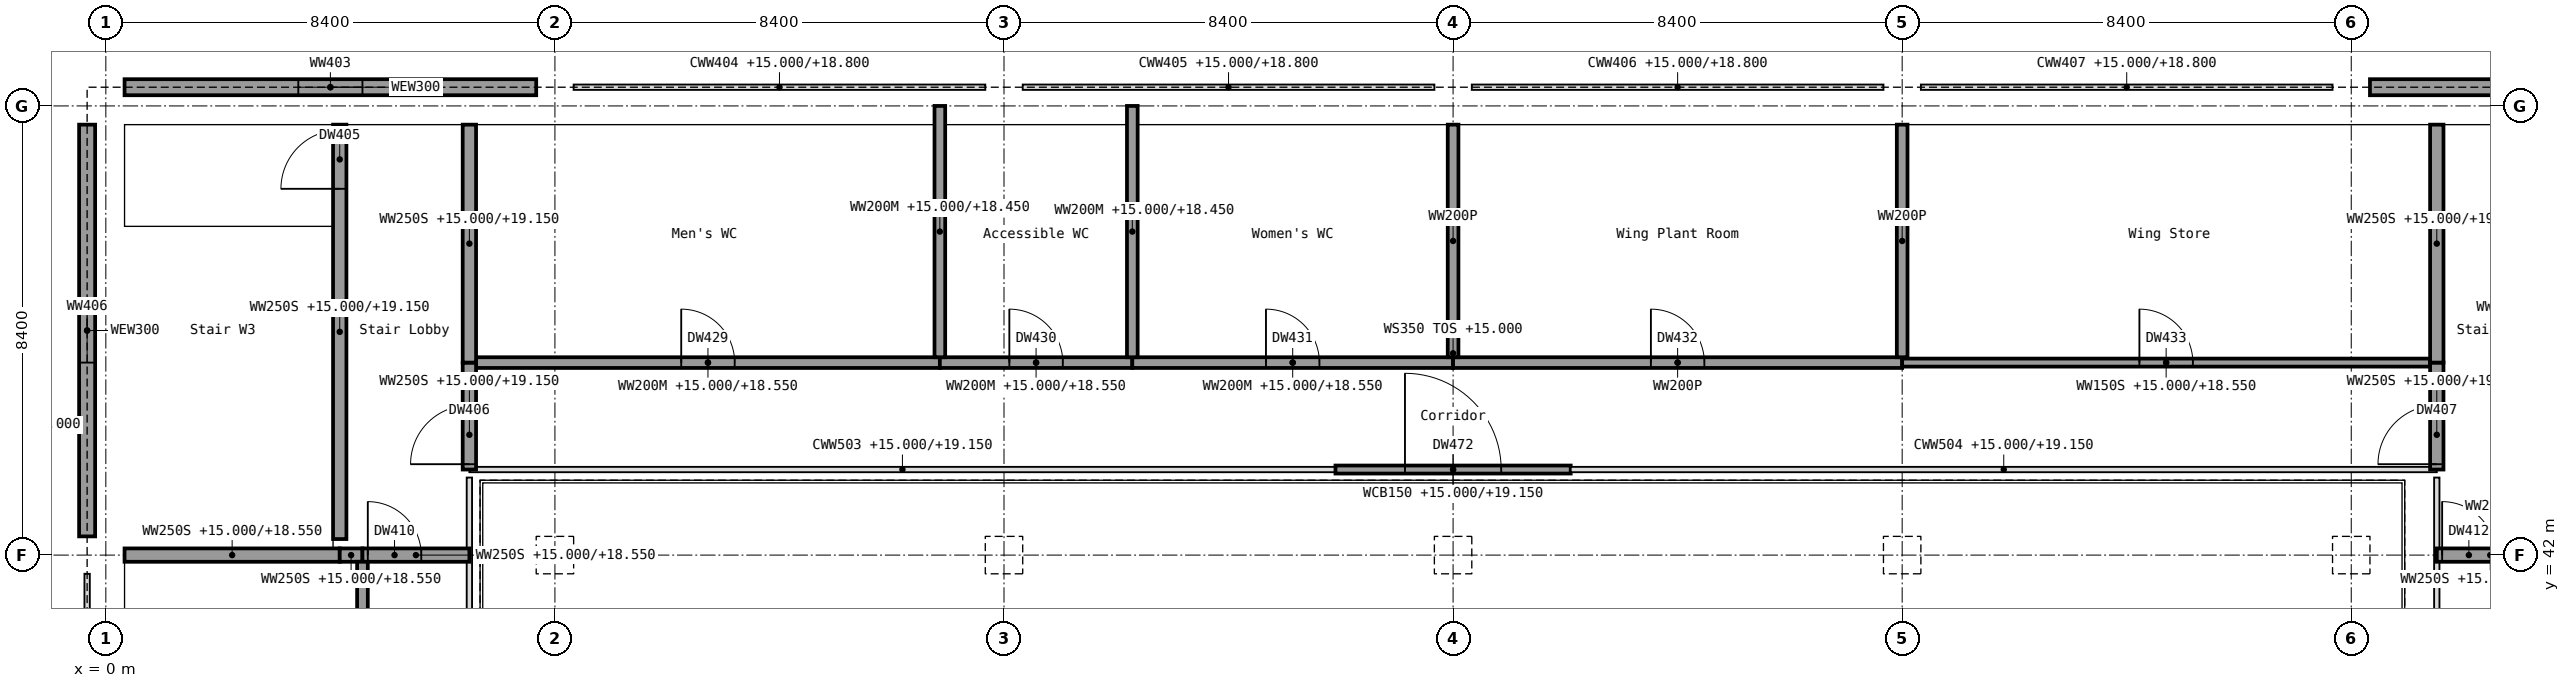
"""IFC4 building model, lengths in metres.
Left out: names, types, materials, properties, quantities, classifications, styles, units other than length and angle.
Written with IfcOpenShell. Run it as: python <this file> out.ifc"""

import sys

from ifc_helpers import new_model, si_unit, direction, frame, frame_2d, origin, origin_2d, place, context, subcontext, project, spatial, rectangle, extrude, element, fill, save


model = new_model("IFC4")
c1 = context("Model", 3, precision=1e-05, world=origin(), true_north=direction((0.0, 1.0)))
c2 = subcontext(c1, "Body", "Model", "MODEL_VIEW")
j1 = project(units=[si_unit("LENGTHUNIT", "METRE"), si_unit("PLANEANGLEUNIT", "RADIAN")], contexts=[c1])
p1 = place(None, origin())
s1 = spatial("IfcSite", under=j1, at=p1, CompositionType="ELEMENT")
p2 = place(p1, origin())
s2 = spatial("IfcBuilding", under=s1, at=p2, CompositionType="ELEMENT")
p3 = place(p2, frame((0.0, 0.0, 15.0)))
s3 = spatial("IfcBuildingStorey", under=s2, at=p3, CompositionType="ELEMENT", Elevation=15.0)
for number, where, z_axis, x_axis in (
    (1, (0.0, 42.0, 0.0), (0.0, 0.0, 1.0), (1.0, 0.0, 0.0)),
    (2, (0.0, 50.4, 0.0), (0.0, 0.0, 1.0), (1.0, 0.0, 0.0)),
    (3, (8.4, 42.0, 0.0), (0.0, 0.0, 1.0), (1.0, 0.0, 0.0)),
    (4, (8.4, 50.4, 0.0), (0.0, 0.0, 1.0), (1.0, 0.0, 0.0)),
    (5, (16.8, 42.0, 0.0), (0.0, 0.0, 1.0), (1.0, 0.0, 0.0)),
    (6, (16.8, 50.4, 0.0), (0.0, 0.0, 1.0), (1.0, 0.0, 0.0)),
    (7, (25.2, 42.0, 0.0), (0.0, 0.0, 1.0), (1.0, 0.0, 0.0)),
    (8, (25.2, 50.4, 0.0), (0.0, 0.0, 1.0), (1.0, 0.0, 0.0)),
    (9, (33.6, 42.0, 0.0), (0.0, 0.0, 1.0), (1.0, 0.0, 0.0)),
    (10, (33.6, 50.4, 0.0), (0.0, 0.0, 1.0), (1.0, 0.0, 0.0)),
    (11, (42.0, 42.0, 0.0), (0.0, 0.0, 1.0), (1.0, 0.0, 0.0)),
    (12, (42.0, 50.4, 0.0), (0.0, 0.0, 1.0), (1.0, 0.0, 0.0)),
):
    element("IfcColumn", number, at=place(p3, frame(where, z_axis=z_axis, x_axis=x_axis)), inside=s3, PredefinedType="COLUMN", context=c2, shape_type="SweptSolid", body=[
        extrude(rectangle(XDim=0.7, YDim=0.7, at=origin_2d()), origin(), (0.0, 0.0, 1.0), 4.5),
    ])
p4 = place(p3, frame((0.35, 50.75, 0.0), z_axis=(0.0, 0.0, 1.0), x_axis=(1.0, 0.0, 0.0)))
e13 = element("IfcWall", 13, at=p4, inside=s3, PredefinedType="SOLIDWALL", context=c2, shape_type="SweptSolid", body=[
    extrude(rectangle(XDim=7.7, YDim=0.3, at=frame_2d((3.85, 0.0))), origin(), (0.0, 0.0, 1.0), 3.8),
])
p5 = place(p4, frame((3.25, 0.0, 1.0)))
e14 = element("IfcOpeningElement", 14, at=p5, cuts=e13, PredefinedType="OPENING", context=c2, shape_type="SweptSolid", body=[
    extrude(rectangle(XDim=1.2, YDim=1.5, at=frame_2d((0.6, 0.75))), frame((0.0, 0.15, 0.0), z_axis=(0.0, -1.0, 0.0), x_axis=(1.0, 0.0, 0.0)), (0.0, 0.0, 1.0), 0.3),
])
p6 = place(p3, frame((42.35, 50.75, 0.0), z_axis=(0.0, 0.0, 1.0), x_axis=(1.0, 0.0, 0.0)))
e15 = element("IfcWall", 15, at=p6, inside=s3, PredefinedType="SOLIDWALL", context=c2, shape_type="SweptSolid", body=[
    extrude(rectangle(XDim=7.7, YDim=0.3, at=frame_2d((3.85, 0.0))), origin(), (0.0, 0.0, 1.0), 3.8),
])
p7 = place(p6, frame((3.25, 0.0, 1.0)))
e16 = element("IfcOpeningElement", 16, at=p7, cuts=e15, PredefinedType="OPENING", context=c2, shape_type="SweptSolid", body=[
    extrude(rectangle(XDim=1.2, YDim=1.5, at=frame_2d((0.6, 0.75))), frame((0.0, 0.15, 0.0), z_axis=(0.0, -1.0, 0.0), x_axis=(1.0, 0.0, 0.0)), (0.0, 0.0, 1.0), 0.3),
])
p8 = place(p3, frame((-0.35, 42.35, 0.0), z_axis=(0.0, 0.0, 1.0), x_axis=(0.0, 1.0, 0.0)))
e17 = element("IfcWall", 17, at=p8, inside=s3, PredefinedType="SOLIDWALL", context=c2, shape_type="SweptSolid", body=[
    extrude(rectangle(XDim=7.7, YDim=0.3, at=frame_2d((3.85, 0.0))), origin(), (0.0, 0.0, 1.0), 3.8),
])
p9 = place(p8, frame((3.25, 0.0, 1.0)))
e18 = element("IfcOpeningElement", 18, at=p9, cuts=e17, PredefinedType="OPENING", context=c2, shape_type="SweptSolid", body=[
    extrude(rectangle(XDim=1.2, YDim=1.5, at=frame_2d((0.6, 0.75))), frame((0.0, 0.15, 0.0), z_axis=(0.0, -1.0, 0.0), x_axis=(1.0, 0.0, 0.0)), (0.0, 0.0, 1.0), 0.3),
])
p10 = place(p3, frame((23.0, 43.6, 0.0), z_axis=(0.0, 0.0, 1.0), x_axis=(1.0, 0.0, 0.0)))
e19 = element("IfcWall", 19, at=p10, inside=s3, PredefinedType="SOLIDWALL", context=c2, shape_type="SweptSolid", body=[
    extrude(rectangle(XDim=4.4, YDim=0.15, at=frame_2d((2.2, 0.0))), origin(), (0.0, 0.0, 1.0), 4.15),
])
p11 = place(p10, frame((1.3, 0.0, 0.0)))
e20 = element("IfcOpeningElement", 20, at=p11, cuts=e19, PredefinedType="OPENING", context=c2, shape_type="SweptSolid", body=[
    extrude(rectangle(XDim=1.8, YDim=2.4, at=frame_2d((0.9, 1.2))), frame((0.0, 0.075, 0.0), z_axis=(0.0, -1.0, 0.0), x_axis=(1.0, 0.0, 0.0)), (0.0, 0.0, 1.0), 0.15),
])
p12 = place(p3, frame((0.35, 42.0, 0.0), z_axis=(0.0, 0.0, 1.0), x_axis=(1.0, 0.0, 0.0)))
e21 = element("IfcWall", 21, at=p12, inside=s3, PredefinedType="SHEAR", context=c2, shape_type="SweptSolid", body=[
    extrude(rectangle(XDim=4.025, YDim=0.25, at=frame_2d((2.012, 0.0))), origin(), (0.0, 0.0, 1.0), 3.55),
])
p13 = place(p3, frame((4.375, 42.0, 0.0), z_axis=(0.0, 0.0, 1.0), x_axis=(1.0, 0.0, 0.0)))
e22 = element("IfcWall", 22, at=p13, inside=s3, PredefinedType="SHEAR", context=c2, shape_type="SweptSolid", body=[
    extrude(rectangle(XDim=0.425, YDim=0.25, at=frame_2d((0.212, 0.0))), origin(), (0.0, 0.0, 1.0), 3.55),
])
p14 = place(p3, frame((4.8, 42.0, 0.0), z_axis=(0.0, 0.0, 1.0), x_axis=(1.0, 0.0, 0.0)))
e23 = element("IfcWall", 23, at=p14, inside=s3, PredefinedType="SHEAR", context=c2, shape_type="SweptSolid", body=[
    extrude(rectangle(XDim=2.0, YDim=0.25, at=frame_2d((1.0, 0.0))), origin(), (0.0, 0.0, 1.0), 3.55),
])
p15 = place(p14, frame((0.1, 0.0, 0.0)))
e24 = element("IfcOpeningElement", 24, at=p15, cuts=e23, PredefinedType="OPENING", context=c2, shape_type="SweptSolid", body=[
    extrude(rectangle(XDim=1.0, YDim=2.1, at=frame_2d((0.5, 1.05))), frame((0.0, 0.125, 0.0), z_axis=(0.0, -1.0, 0.0), x_axis=(1.0, 0.0, 0.0)), (0.0, 0.0, 1.0), 0.25),
])
p16 = place(p3, frame((43.6, 42.0, 0.0), z_axis=(0.0, 0.0, 1.0), x_axis=(1.0, 0.0, 0.0)))
e25 = element("IfcWall", 25, at=p16, inside=s3, PredefinedType="SHEAR", context=c2, shape_type="SweptSolid", body=[
    extrude(rectangle(XDim=2.0, YDim=0.25, at=frame_2d((1.0, 0.0))), origin(), (0.0, 0.0, 1.0), 3.55),
])
p17 = place(p16, frame((0.1, 0.0, 0.0)))
e26 = element("IfcOpeningElement", 26, at=p17, cuts=e25, PredefinedType="OPENING", context=c2, shape_type="SweptSolid", body=[
    extrude(rectangle(XDim=1.0, YDim=2.1, at=frame_2d((0.5, 1.05))), frame((0.0, 0.125, 0.0), z_axis=(0.0, -1.0, 0.0), x_axis=(1.0, 0.0, 0.0)), (0.0, 0.0, 1.0), 0.25),
])
p18 = place(p3, frame((6.925, 45.6, 0.0), z_axis=(0.0, 0.0, 1.0), x_axis=(1.0, 0.0, 0.0)))
e27 = element("IfcWall", 27, at=p18, inside=s3, PredefinedType="PARTITIONING", context=c2, shape_type="SweptSolid", body=[
    extrude(rectangle(XDim=8.675, YDim=0.2, at=frame_2d((4.337, 0.0))), origin(), (0.0, 0.0, 1.0), 3.55),
])
p19 = place(p18, frame((3.837, 0.0, 0.0)))
e28 = element("IfcOpeningElement", 28, at=p19, cuts=e27, PredefinedType="OPENING", context=c2, shape_type="SweptSolid", body=[
    extrude(rectangle(XDim=1.0, YDim=2.1, at=frame_2d((0.5, 1.05))), frame((0.0, 0.1, 0.0), z_axis=(0.0, -1.0, 0.0), x_axis=(1.0, 0.0, 0.0)), (0.0, 0.0, 1.0), 0.2),
])
p20 = place(p3, frame((15.6, 45.6, 0.0), z_axis=(0.0, 0.0, 1.0), x_axis=(1.0, 0.0, 0.0)))
e29 = element("IfcWall", 29, at=p20, inside=s3, PredefinedType="PARTITIONING", context=c2, shape_type="SweptSolid", body=[
    extrude(rectangle(XDim=3.6, YDim=0.2, at=frame_2d((1.8, 0.0))), origin(), (0.0, 0.0, 1.0), 3.55),
])
p21 = place(p20, frame((1.3, 0.0, 0.0)))
e30 = element("IfcOpeningElement", 30, at=p21, cuts=e29, PredefinedType="OPENING", context=c2, shape_type="SweptSolid", body=[
    extrude(rectangle(XDim=1.0, YDim=2.1, at=frame_2d((0.5, 1.05))), frame((0.0, 0.1, 0.0), z_axis=(0.0, -1.0, 0.0), x_axis=(1.0, 0.0, 0.0)), (0.0, 0.0, 1.0), 0.2),
])
p22 = place(p3, frame((19.2, 45.6, 0.0), z_axis=(0.0, 0.0, 1.0), x_axis=(1.0, 0.0, 0.0)))
e31 = element("IfcWall", 31, at=p22, inside=s3, PredefinedType="PARTITIONING", context=c2, shape_type="SweptSolid", body=[
    extrude(rectangle(XDim=6.0, YDim=0.2, at=frame_2d((3.0, 0.0))), origin(), (0.0, 0.0, 1.0), 3.55),
])
p23 = place(p22, frame((2.5, 0.0, 0.0)))
e32 = element("IfcOpeningElement", 32, at=p23, cuts=e31, PredefinedType="OPENING", context=c2, shape_type="SweptSolid", body=[
    extrude(rectangle(XDim=1.0, YDim=2.1, at=frame_2d((0.5, 1.05))), frame((0.0, 0.1, 0.0), z_axis=(0.0, -1.0, 0.0), x_axis=(1.0, 0.0, 0.0)), (0.0, 0.0, 1.0), 0.2),
])
p24 = place(p3, frame((25.2, 45.6, 0.0), z_axis=(0.0, 0.0, 1.0), x_axis=(1.0, 0.0, 0.0)))
e33 = element("IfcWall", 33, at=p24, inside=s3, PredefinedType="SOLIDWALL", context=c2, shape_type="SweptSolid", body=[
    extrude(rectangle(XDim=8.4, YDim=0.2, at=frame_2d((4.2, 0.0))), origin(), (0.0, 0.0, 1.0), 3.55),
])
p25 = place(p24, frame((3.7, 0.0, 0.0)))
e34 = element("IfcOpeningElement", 34, at=p25, cuts=e33, PredefinedType="OPENING", context=c2, shape_type="SweptSolid", body=[
    extrude(rectangle(XDim=1.0, YDim=2.1, at=frame_2d((0.5, 1.05))), frame((0.0, 0.1, 0.0), z_axis=(0.0, -1.0, 0.0), x_axis=(1.0, 0.0, 0.0)), (0.0, 0.0, 1.0), 0.2),
])
p26 = place(p3, frame((33.6, 45.6, 0.0), z_axis=(0.0, 0.0, 1.0), x_axis=(1.0, 0.0, 0.0)))
e35 = element("IfcWall", 35, at=p26, inside=s3, PredefinedType="PARTITIONING", context=c2, shape_type="SweptSolid", body=[
    extrude(rectangle(XDim=9.875, YDim=0.15, at=frame_2d((4.938, 0.0))), origin(), (0.0, 0.0, 1.0), 3.55),
])
p27 = place(p26, frame((4.438, 0.0, 0.0)))
e36 = element("IfcOpeningElement", 36, at=p27, cuts=e35, PredefinedType="OPENING", context=c2, shape_type="SweptSolid", body=[
    extrude(rectangle(XDim=1.0, YDim=2.1, at=frame_2d((0.5, 1.05))), frame((0.0, 0.075, 0.0), z_axis=(0.0, -1.0, 0.0), x_axis=(1.0, 0.0, 0.0)), (0.0, 0.0, 1.0), 0.15),
])
p28 = place(p3, frame((4.375, 42.3, 0.0), z_axis=(0.0, 0.0, 1.0), x_axis=(0.0, 1.0, 0.0)))
e37 = element("IfcWall", 37, at=p28, inside=s3, PredefinedType="SHEAR", context=c2, shape_type="SweptSolid", body=[
    extrude(rectangle(XDim=7.75, YDim=0.25, at=frame_2d((3.875, 0.0))), origin(), (0.0, 0.0, 1.0), 4.15),
])
p29 = place(p28, frame((6.55, 0.0, 0.0)))
e38 = element("IfcOpeningElement", 38, at=p29, cuts=e37, PredefinedType="OPENING", context=c2, shape_type="SweptSolid", body=[
    extrude(rectangle(XDim=1.1, YDim=2.1, at=frame_2d((0.55, 1.05))), frame((0.0, 0.125, 0.0), z_axis=(0.0, -1.0, 0.0), x_axis=(1.0, 0.0, 0.0)), (0.0, 0.0, 1.0), 0.25),
])
p30 = place(p3, frame((4.8, 33.6, 0.0), z_axis=(0.0, 0.0, 1.0), x_axis=(0.0, 1.0, 0.0)))
e39 = element("IfcWall", 39, at=p30, inside=s3, PredefinedType="PARTITIONING", context=c2, shape_type="SweptSolid", body=[
    extrude(rectangle(XDim=8.275, YDim=0.2, at=frame_2d((4.137, 0.0))), origin(), (0.0, 0.0, 1.0), 3.55),
])
p31 = place(p30, frame((3.637, 0.0, 0.0)))
e40 = element("IfcOpeningElement", 40, at=p31, cuts=e39, PredefinedType="OPENING", context=c2, shape_type="SweptSolid", body=[
    extrude(rectangle(XDim=1.0, YDim=2.1, at=frame_2d((0.5, 1.05))), frame((0.0, 0.1, 0.0), z_axis=(0.0, -1.0, 0.0), x_axis=(1.0, 0.0, 0.0)), (0.0, 0.0, 1.0), 0.2),
])
p32 = place(p3, frame((6.8, 43.6, 0.0), z_axis=(0.0, 0.0, 1.0), x_axis=(0.0, 1.0, 0.0)))
e41 = element("IfcWall", 41, at=p32, inside=s3, PredefinedType="SHEAR", context=c2, shape_type="SweptSolid", body=[
    extrude(rectangle(XDim=2.0, YDim=0.25, at=frame_2d((1.0, 0.0))), origin(), (0.0, 0.0, 1.0), 4.15),
])
p33 = place(p32, frame((0.1, 0.0, 0.0)))
e42 = element("IfcOpeningElement", 42, at=p33, cuts=e41, PredefinedType="OPENING", context=c2, shape_type="SweptSolid", body=[
    extrude(rectangle(XDim=1.1, YDim=2.1, at=frame_2d((0.55, 1.05))), frame((0.0, 0.125, 0.0), z_axis=(0.0, -1.0, 0.0), x_axis=(1.0, 0.0, 0.0)), (0.0, 0.0, 1.0), 0.25),
])
p34 = place(p3, frame((6.8, 45.6, 0.0), z_axis=(0.0, 0.0, 1.0), x_axis=(0.0, 1.0, 0.0)))
e43 = element("IfcWall", 43, at=p34, inside=s3, PredefinedType="SHEAR", context=c2, shape_type="SweptSolid", body=[
    extrude(rectangle(XDim=4.45, YDim=0.25, at=frame_2d((2.225, 0.0))), origin(), (0.0, 0.0, 1.0), 4.15),
])
for number, where, z_axis, x_axis in (
    (44, (15.6, 45.7, 0.0), (0.0, 0.0, 1.0), (0.0, 1.0, 0.0)),
    (45, (19.2, 45.7, 0.0), (0.0, 0.0, 1.0), (0.0, 1.0, 0.0)),
):
    element("IfcWall", number, at=place(p3, frame(where, z_axis=z_axis, x_axis=x_axis)), inside=s3, PredefinedType="PARTITIONING", context=c2, shape_type="SweptSolid", body=[
        extrude(rectangle(XDim=4.7, YDim=0.2, at=frame_2d((2.35, 0.0))), origin(), (0.0, 0.0, 1.0), 3.45),
    ])
for number, where, z_axis, x_axis in (
    (46, (25.2, 45.7, 0.0), (0.0, 0.0, 1.0), (0.0, 1.0, 0.0)),
    (47, (33.6, 45.7, 0.0), (0.0, 0.0, 1.0), (0.0, 1.0, 0.0)),
):
    element("IfcWall", number, at=place(p3, frame(where, z_axis=z_axis, x_axis=x_axis)), inside=s3, PredefinedType="SOLIDWALL", context=c2, shape_type="SweptSolid", body=[
        extrude(rectangle(XDim=4.35, YDim=0.2, at=frame_2d((2.175, 0.0))), origin(), (0.0, 0.0, 1.0), 3.55),
    ])
p35 = place(p3, frame((43.6, 43.6, 0.0), z_axis=(0.0, 0.0, 1.0), x_axis=(0.0, 1.0, 0.0)))
e48 = element("IfcWall", 48, at=p35, inside=s3, PredefinedType="SHEAR", context=c2, shape_type="SweptSolid", body=[
    extrude(rectangle(XDim=2.0, YDim=0.25, at=frame_2d((1.0, 0.0))), origin(), (0.0, 0.0, 1.0), 4.15),
])
p36 = place(p35, frame((0.1, 0.0, 0.0)))
e49 = element("IfcOpeningElement", 49, at=p36, cuts=e48, PredefinedType="OPENING", context=c2, shape_type="SweptSolid", body=[
    extrude(rectangle(XDim=1.1, YDim=2.1, at=frame_2d((0.55, 1.05))), frame((0.0, 0.125, 0.0), z_axis=(0.0, -1.0, 0.0), x_axis=(1.0, 0.0, 0.0)), (0.0, 0.0, 1.0), 0.25),
])
p37 = place(p3, frame((43.6, 45.6, 0.0), z_axis=(0.0, 0.0, 1.0), x_axis=(0.0, 1.0, 0.0)))
e50 = element("IfcWall", 50, at=p37, inside=s3, PredefinedType="SHEAR", context=c2, shape_type="SweptSolid", body=[
    extrude(rectangle(XDim=4.45, YDim=0.25, at=frame_2d((2.225, 0.0))), origin(), (0.0, 0.0, 1.0), 4.15),
])
p38 = place(p5, origin())
e51 = element("IfcWindow", 51, at=p38, inside=s3, PartitioningType="SINGLE_PANEL", PredefinedType="WINDOW", context=c2, shape_type="SweptSolid", body=[
    extrude(rectangle(XDim=1.2, YDim=1.5, at=frame_2d((0.6, 0.75))), frame((0.0, 0.03, 0.0), z_axis=(0.0, -1.0, 0.0), x_axis=(1.0, 0.0, 0.0)), (0.0, 0.0, 1.0), 0.06),
])
fill(e14, e51)
p39 = place(p9, origin())
e52 = element("IfcWindow", 52, at=p39, inside=s3, PartitioningType="SINGLE_PANEL", PredefinedType="WINDOW", context=c2, shape_type="SweptSolid", body=[
    extrude(rectangle(XDim=1.2, YDim=1.5, at=frame_2d((0.6, 0.75))), frame((0.0, 0.03, 0.0), z_axis=(0.0, -1.0, 0.0), x_axis=(1.0, 0.0, 0.0)), (0.0, 0.0, 1.0), 0.06),
])
fill(e18, e52)
p40 = place(p11, origin())
e53 = element("IfcDoor", 53, at=p40, inside=s3, OperationType="DOUBLE_DOOR_DOUBLE_SWING", PredefinedType="DOOR", context=c2, shape_type="SweptSolid", body=[
    extrude(rectangle(XDim=1.8, YDim=2.4, at=frame_2d((0.9, 1.2))), frame((0.0, 0.025, 0.0), z_axis=(0.0, -1.0, 0.0), x_axis=(1.0, 0.0, 0.0)), (0.0, 0.0, 1.0), 0.05),
])
fill(e20, e53)
p41 = place(p29, origin())
e54 = element("IfcDoor", 54, at=p41, inside=s3, OperationType="SINGLE_SWING_RIGHT", PredefinedType="DOOR", context=c2, shape_type="SweptSolid", body=[
    extrude(rectangle(XDim=1.1, YDim=2.1, at=frame_2d((0.55, 1.05))), frame((0.0, 0.025, 0.0), z_axis=(0.0, -1.0, 0.0), x_axis=(1.0, 0.0, 0.0)), (0.0, 0.0, 1.0), 0.05),
])
fill(e38, e54)
p42 = place(p33, origin())
e55 = element("IfcDoor", 55, at=p42, inside=s3, OperationType="SINGLE_SWING_LEFT", PredefinedType="DOOR", context=c2, shape_type="SweptSolid", body=[
    extrude(rectangle(XDim=1.1, YDim=2.1, at=frame_2d((0.55, 1.05))), frame((0.0, 0.025, 0.0), z_axis=(0.0, -1.0, 0.0), x_axis=(1.0, 0.0, 0.0)), (0.0, 0.0, 1.0), 0.05),
])
fill(e42, e55)
p43 = place(p36, origin())
e56 = element("IfcDoor", 56, at=p43, inside=s3, OperationType="SINGLE_SWING_LEFT", PredefinedType="DOOR", context=c2, shape_type="SweptSolid", body=[
    extrude(rectangle(XDim=1.1, YDim=2.1, at=frame_2d((0.55, 1.05))), frame((0.0, 0.025, 0.0), z_axis=(0.0, -1.0, 0.0), x_axis=(1.0, 0.0, 0.0)), (0.0, 0.0, 1.0), 0.05),
])
fill(e49, e56)
p44 = place(p15, origin())
e57 = element("IfcDoor", 57, at=p44, inside=s3, OperationType="SINGLE_SWING_LEFT", PredefinedType="DOOR", context=c2, shape_type="SweptSolid", body=[
    extrude(rectangle(XDim=1.0, YDim=2.1, at=frame_2d((0.5, 1.05))), frame((0.0, 0.025, 0.0), z_axis=(0.0, -1.0, 0.0), x_axis=(1.0, 0.0, 0.0)), (0.0, 0.0, 1.0), 0.05),
])
fill(e24, e57)
p45 = place(p17, origin())
e58 = element("IfcDoor", 58, at=p45, inside=s3, OperationType="SINGLE_SWING_LEFT", PredefinedType="DOOR", context=c2, shape_type="SweptSolid", body=[
    extrude(rectangle(XDim=1.0, YDim=2.1, at=frame_2d((0.5, 1.05))), frame((0.0, 0.025, 0.0), z_axis=(0.0, -1.0, 0.0), x_axis=(1.0, 0.0, 0.0)), (0.0, 0.0, 1.0), 0.05),
])
fill(e26, e58)
p46 = place(p19, origin())
e59 = element("IfcDoor", 59, at=p46, inside=s3, OperationType="SINGLE_SWING_LEFT", PredefinedType="DOOR", context=c2, shape_type="SweptSolid", body=[
    extrude(rectangle(XDim=1.0, YDim=2.1, at=frame_2d((0.5, 1.05))), frame((0.0, 0.025, 0.0), z_axis=(0.0, -1.0, 0.0), x_axis=(1.0, 0.0, 0.0)), (0.0, 0.0, 1.0), 0.05),
])
fill(e28, e59)
p47 = place(p21, origin())
e60 = element("IfcDoor", 60, at=p47, inside=s3, OperationType="SINGLE_SWING_LEFT", PredefinedType="DOOR", context=c2, shape_type="SweptSolid", body=[
    extrude(rectangle(XDim=1.0, YDim=2.1, at=frame_2d((0.5, 1.05))), frame((0.0, 0.025, 0.0), z_axis=(0.0, -1.0, 0.0), x_axis=(1.0, 0.0, 0.0)), (0.0, 0.0, 1.0), 0.05),
])
fill(e30, e60)
p48 = place(p23, origin())
e61 = element("IfcDoor", 61, at=p48, inside=s3, OperationType="SINGLE_SWING_LEFT", PredefinedType="DOOR", context=c2, shape_type="SweptSolid", body=[
    extrude(rectangle(XDim=1.0, YDim=2.1, at=frame_2d((0.5, 1.05))), frame((0.0, 0.025, 0.0), z_axis=(0.0, -1.0, 0.0), x_axis=(1.0, 0.0, 0.0)), (0.0, 0.0, 1.0), 0.05),
])
fill(e32, e61)
p49 = place(p25, origin())
e62 = element("IfcDoor", 62, at=p49, inside=s3, OperationType="SINGLE_SWING_LEFT", PredefinedType="DOOR", context=c2, shape_type="SweptSolid", body=[
    extrude(rectangle(XDim=1.0, YDim=2.1, at=frame_2d((0.5, 1.05))), frame((0.0, 0.025, 0.0), z_axis=(0.0, -1.0, 0.0), x_axis=(1.0, 0.0, 0.0)), (0.0, 0.0, 1.0), 0.05),
])
fill(e34, e62)
p50 = place(p27, origin())
e63 = element("IfcDoor", 63, at=p50, inside=s3, OperationType="SINGLE_SWING_LEFT", PredefinedType="DOOR", context=c2, shape_type="SweptSolid", body=[
    extrude(rectangle(XDim=1.0, YDim=2.1, at=frame_2d((0.5, 1.05))), frame((0.0, 0.025, 0.0), z_axis=(0.0, -1.0, 0.0), x_axis=(1.0, 0.0, 0.0)), (0.0, 0.0, 1.0), 0.05),
])
fill(e36, e63)
save(model, sys.argv[1])
